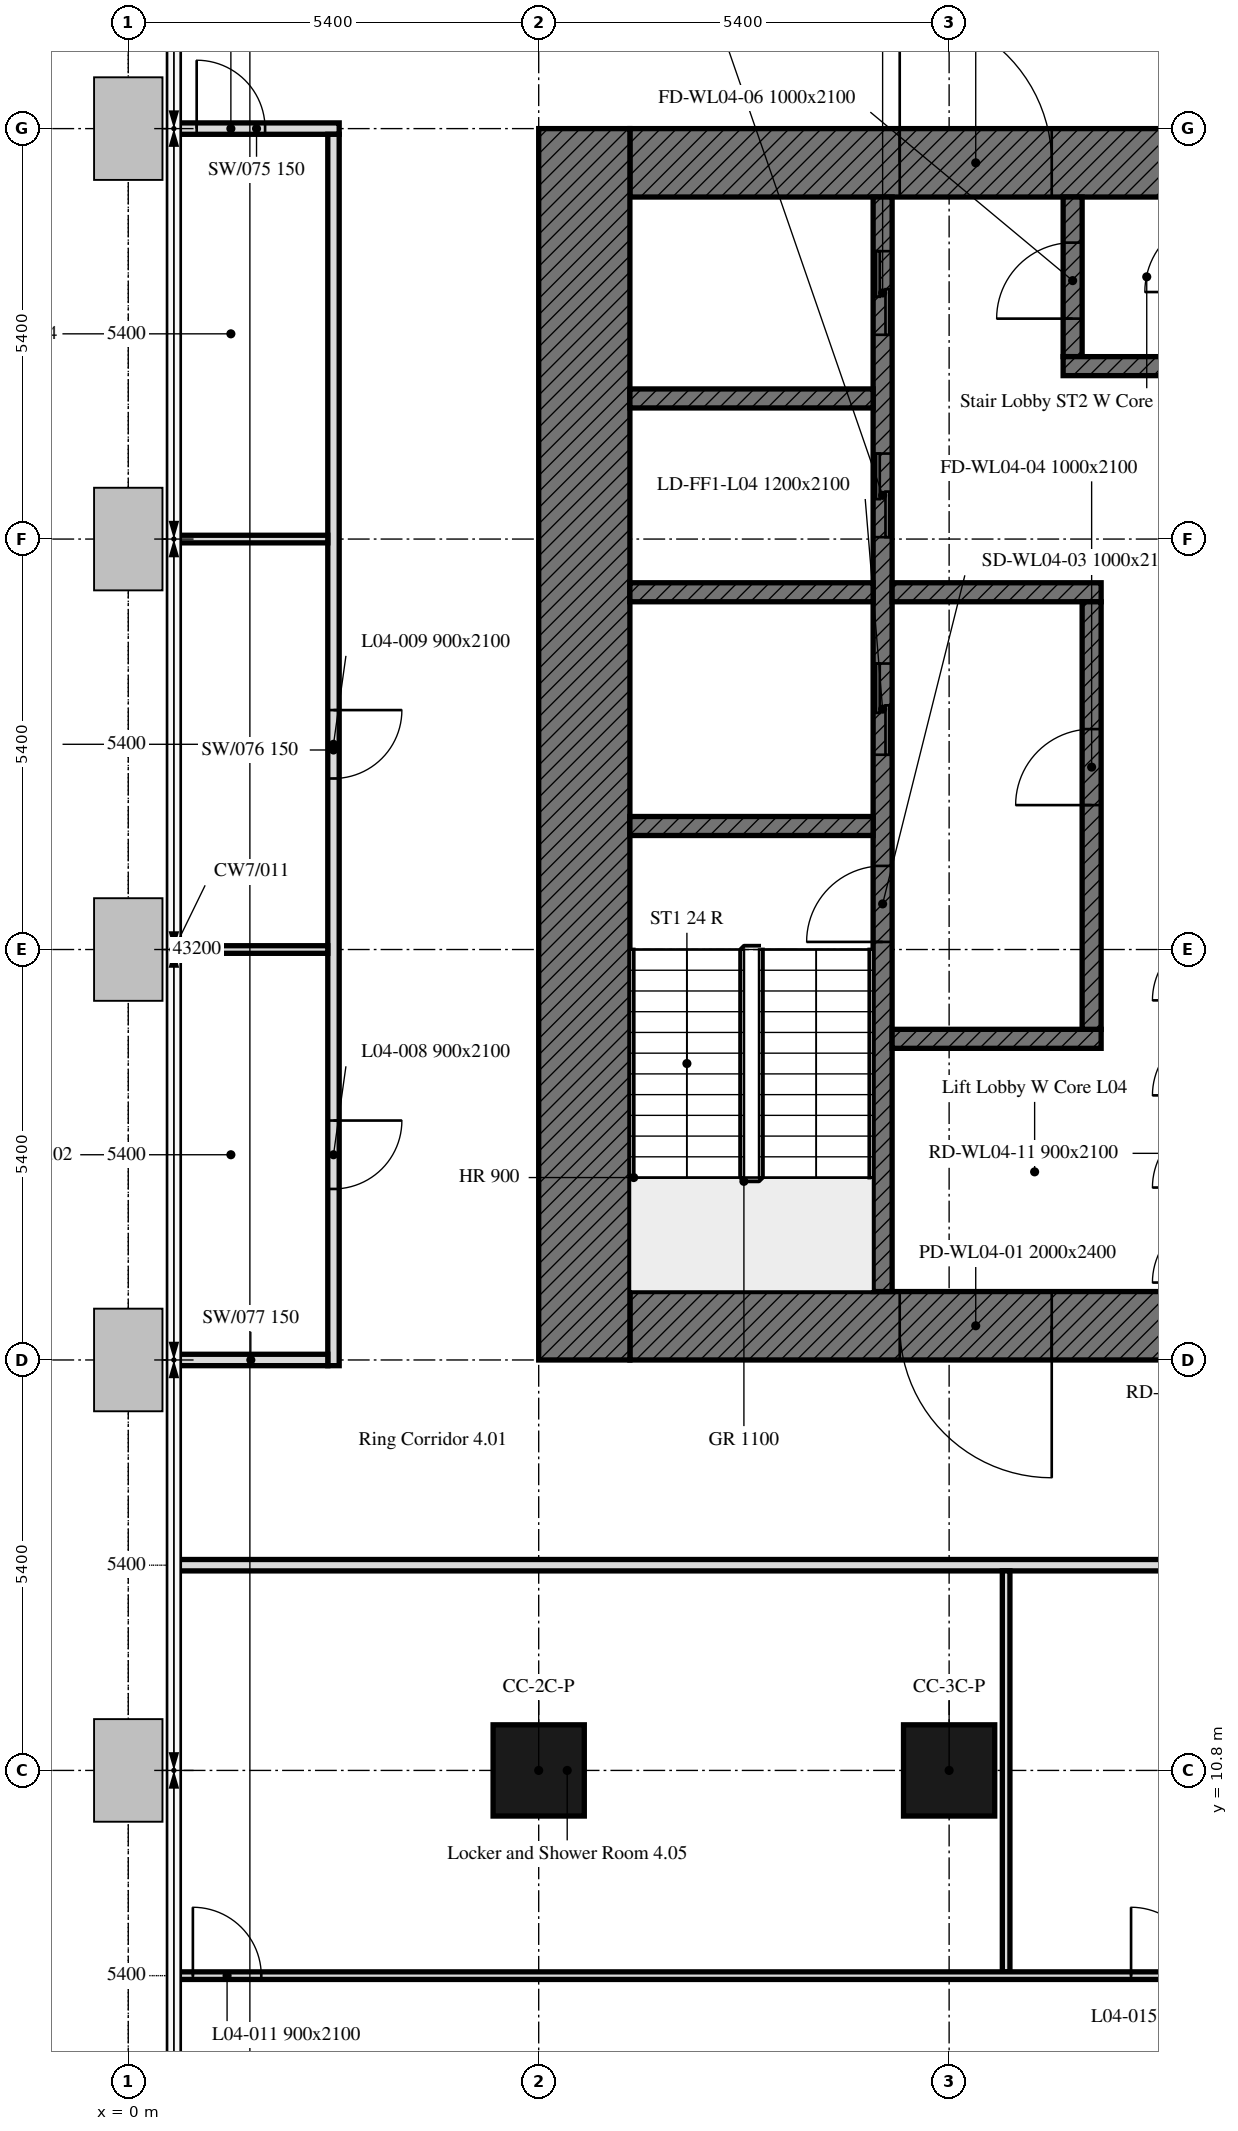
"""IFC4 building model, lengths in metres.
Left out: names, types, materials, properties, quantities, classifications, styles, units other than length and angle.
Written with IfcOpenShell. Run it as: python <this file> out.ifc"""

import sys

from ifc_helpers import new_model, si_unit, direction, frame, frame_2d, origin, origin_2d, place, context, subcontext, project, spatial, rectangle, extrude, element, fill, save


model = new_model("IFC4")
c1 = context("Model", 3, precision=1e-05, world=origin(), true_north=direction((0.0, 1.0)))
c2 = subcontext(c1, "Body", "Model", "MODEL_VIEW")
j1 = project(units=[si_unit("LENGTHUNIT", "METRE"), si_unit("PLANEANGLEUNIT", "RADIAN")], contexts=[c1])
p1 = place(None, origin())
s1 = spatial("IfcSite", under=j1, at=p1, CompositionType="ELEMENT")
p2 = place(p1, origin())
s2 = spatial("IfcBuilding", under=s1, at=p2, CompositionType="ELEMENT")
p3 = place(p2, frame((0.0, 0.0, 24.6)))
s3 = spatial("IfcBuildingStorey", under=s2, at=p3, CompositionType="ELEMENT", Elevation=24.6)
for number, where, z_axis, x_axis in (
    (1, (5.4, 10.8, 0.0), (0.0, 0.0, 1.0), (1.0, 0.0, 0.0)),
    (2, (10.8, 10.8, 0.0), (0.0, 0.0, 1.0), (1.0, 0.0, 0.0)),
):
    element("IfcColumn", number, at=place(p3, frame(where, z_axis=z_axis, x_axis=x_axis)), inside=s3, PredefinedType="COLUMN", context=c2, shape_type="SweptSolid", body=[
        extrude(rectangle(XDim=1.2, YDim=1.2, at=origin_2d()), origin(), (0.0, 0.0, 1.0), 4.1),
    ])
p4 = place(p3, frame((17.7, 16.65, 0.0), z_axis=(0.0, 0.0, 1.0), x_axis=(-1.0, 0.0, 0.0)))
e3 = element("IfcWall", 3, at=p4, inside=s3, PredefinedType="SOLIDWALL", context=c2, shape_type="SweptSolid", body=[
    extrude(rectangle(XDim=11.1, YDim=0.9, at=frame_2d((5.55, 0.0))), origin(), (0.0, 0.0, 1.0), 4.1),
])
p5 = place(p4, frame((5.55, 0.0, 0.0)))
e4 = element("IfcOpeningElement", 4, at=p5, cuts=e3, PredefinedType="OPENING", context=c2, shape_type="SweptSolid", body=[
    extrude(rectangle(XDim=2.0, YDim=2.4, at=frame_2d((1.0, 1.2))), frame((0.0, 0.45, 0.0), z_axis=(0.0, -1.0, 0.0), x_axis=(1.0, 0.0, 0.0)), (0.0, 0.0, 1.0), 0.9),
])
p6 = place(p3, frame((6.6, 31.95, 0.0), z_axis=(0.0, 0.0, 1.0), x_axis=(1.0, 0.0, 0.0)))
e5 = element("IfcWall", 5, at=p6, inside=s3, PredefinedType="SOLIDWALL", context=c2, shape_type="SweptSolid", body=[
    extrude(rectangle(XDim=11.1, YDim=0.9, at=frame_2d((5.55, 0.0))), origin(), (0.0, 0.0, 1.0), 4.1),
])
p7 = place(p6, frame((3.55, 0.0, 0.0)))
e6 = element("IfcOpeningElement", 6, at=p7, cuts=e5, PredefinedType="OPENING", context=c2, shape_type="SweptSolid", body=[
    extrude(rectangle(XDim=2.0, YDim=2.4, at=frame_2d((1.0, 1.2))), frame((0.0, 0.45, 0.0), z_axis=(0.0, -1.0, 0.0), x_axis=(1.0, 0.0, 0.0)), (0.0, 0.0, 1.0), 0.9),
])
p8 = place(p3, frame((6.0, 16.2, 0.0), z_axis=(0.0, 0.0, 1.0), x_axis=(0.0, 1.0, 0.0)))
e7 = element("IfcWall", 7, at=p8, inside=s3, PredefinedType="SOLIDWALL", context=c2, shape_type="SweptSolid", body=[
    extrude(rectangle(XDim=16.2, YDim=1.2, at=frame_2d((8.1, 0.0))), origin(), (0.0, 0.0, 1.0), 4.1),
])
p9 = place(p3, frame((9.925, 17.1, 0.0), z_axis=(0.0, 0.0, 1.0), x_axis=(0.0, 1.0, 0.0)))
e8 = element("IfcWall", 8, at=p9, inside=s3, PredefinedType="SOLIDWALL", context=c2, shape_type="SweptSolid", body=[
    extrude(rectangle(XDim=14.4, YDim=0.25, at=frame_2d((7.2, 0.0))), origin(), (0.0, 0.0, 1.0), 4.1),
])
p10 = place(p9, frame((4.6, 0.0, 0.0)))
e9 = element("IfcOpeningElement", 9, at=p10, cuts=e8, PredefinedType="OPENING", context=c2, shape_type="SweptSolid", body=[
    extrude(rectangle(XDim=1.0, YDim=2.1, at=frame_2d((0.5, 1.05))), frame((0.0, 0.125, 0.0), z_axis=(0.0, -1.0, 0.0), x_axis=(1.0, 0.0, 0.0)), (0.0, 0.0, 1.0), 0.25),
])
p11 = place(p9, frame((7.062, 0.0, 0.0)))
e10 = element("IfcOpeningElement", 10, at=p11, cuts=e8, PredefinedType="OPENING", context=c2, shape_type="SweptSolid", body=[
    extrude(rectangle(XDim=1.2, YDim=2.1, at=frame_2d((0.6, 1.05))), frame((0.0, 0.125, 0.0), z_axis=(0.0, -1.0, 0.0), x_axis=(1.0, 0.0, 0.0)), (0.0, 0.0, 1.0), 0.25),
])
p12 = place(p9, frame((9.925, 0.0, 0.0)))
e11 = element("IfcOpeningElement", 11, at=p12, cuts=e8, PredefinedType="OPENING", context=c2, shape_type="SweptSolid", body=[
    extrude(rectangle(XDim=1.1, YDim=2.1, at=frame_2d((0.55, 1.05))), frame((0.0, 0.125, 0.0), z_axis=(0.0, -1.0, 0.0), x_axis=(1.0, 0.0, 0.0)), (0.0, 0.0, 1.0), 0.25),
])
p13 = place(p9, frame((12.587, 0.0, 0.0)))
e12 = element("IfcOpeningElement", 12, at=p13, cuts=e8, PredefinedType="OPENING", context=c2, shape_type="SweptSolid", body=[
    extrude(rectangle(XDim=1.1, YDim=2.1, at=frame_2d((0.55, 1.05))), frame((0.0, 0.125, 0.0), z_axis=(0.0, -1.0, 0.0), x_axis=(1.0, 0.0, 0.0)), (0.0, 0.0, 1.0), 0.25),
])
for number, where, z_axis, x_axis in (
    (13, (6.6, 23.225, 0.0), (0.0, 0.0, 1.0), (1.0, 0.0, 0.0)),
    (14, (6.6, 26.3, 0.0), (0.0, 0.0, 1.0), (1.0, 0.0, 0.0)),
):
    element("IfcWall", number, at=place(p3, frame(where, z_axis=z_axis, x_axis=x_axis)), inside=s3, PredefinedType="SOLIDWALL", context=c2, shape_type="SweptSolid", body=[
        extrude(rectangle(XDim=3.2, YDim=0.25, at=frame_2d((1.6, 0.0))), origin(), (0.0, 0.0, 1.0), 4.1),
    ])
for number, where, z_axis, x_axis in (
    (15, (10.05, 26.3, 0.0), (0.0, 0.0, 1.0), (1.0, 0.0, 0.0)),
    (16, (10.05, 20.425, 0.0), (0.0, 0.0, 1.0), (1.0, 0.0, 0.0)),
):
    element("IfcWall", number, at=place(p3, frame(where, z_axis=z_axis, x_axis=x_axis)), inside=s3, PredefinedType="SOLIDWALL", context=c2, shape_type="SweptSolid", body=[
        extrude(rectangle(XDim=2.75, YDim=0.25, at=frame_2d((1.375, 0.0))), origin(), (0.0, 0.0, 1.0), 4.1),
    ])
p14 = place(p3, frame((12.425, 29.4, 0.0), z_axis=(0.0, 0.0, 1.0), x_axis=(0.0, 1.0, 0.0)))
e17 = element("IfcWall", 17, at=p14, inside=s3, PredefinedType="SOLIDWALL", context=c2, shape_type="SweptSolid", body=[
    extrude(rectangle(XDim=2.1, YDim=0.25, at=frame_2d((1.05, 0.0))), origin(), (0.0, 0.0, 1.0), 4.1),
])
p15 = place(p14, frame((0.5, 0.0, 0.0)))
e18 = element("IfcOpeningElement", 18, at=p15, cuts=e17, PredefinedType="OPENING", context=c2, shape_type="SweptSolid", body=[
    extrude(rectangle(XDim=1.0, YDim=2.1, at=frame_2d((0.5, 1.05))), frame((0.0, 0.125, 0.0), z_axis=(0.0, -1.0, 0.0), x_axis=(1.0, 0.0, 0.0)), (0.0, 0.0, 1.0), 0.25),
])
p16 = place(p3, frame((12.3, 29.275, 0.0), z_axis=(0.0, 0.0, 1.0), x_axis=(1.0, 0.0, 0.0)))
e19 = element("IfcWall", 19, at=p16, inside=s3, PredefinedType="SOLIDWALL", context=c2, shape_type="SweptSolid", body=[
    extrude(rectangle(XDim=1.95, YDim=0.25, at=frame_2d((0.975, 0.0))), origin(), (0.0, 0.0, 1.0), 4.1),
])
p17 = place(p3, frame((12.675, 20.55, 0.0), z_axis=(0.0, 0.0, 1.0), x_axis=(0.0, 1.0, 0.0)))
e20 = element("IfcWall", 20, at=p17, inside=s3, PredefinedType="SOLIDWALL", context=c2, shape_type="SweptSolid", body=[
    extrude(rectangle(XDim=5.625, YDim=0.25, at=frame_2d((2.812, 0.0))), origin(), (0.0, 0.0, 1.0), 4.1),
])
p18 = place(p17, frame((2.95, 0.0, 0.0)))
e21 = element("IfcOpeningElement", 21, at=p18, cuts=e20, PredefinedType="OPENING", context=c2, shape_type="SweptSolid", body=[
    extrude(rectangle(XDim=1.0, YDim=2.1, at=frame_2d((0.5, 1.05))), frame((0.0, 0.125, 0.0), z_axis=(0.0, -1.0, 0.0), x_axis=(1.0, 0.0, 0.0)), (0.0, 0.0, 1.0), 0.25),
])
p19 = place(p3, frame((6.6, 28.85, 0.0), z_axis=(0.0, 0.0, 1.0), x_axis=(1.0, 0.0, 0.0)))
e22 = element("IfcWall", 22, at=p19, inside=s3, PredefinedType="SOLIDWALL", context=c2, shape_type="SweptSolid", body=[
    extrude(rectangle(XDim=3.2, YDim=0.25, at=frame_2d((1.6, 0.0))), origin(), (0.0, 0.0, 1.0), 4.1),
])
p20 = place(p3, frame((0.6, 32.4, 0.0), z_axis=(0.0, 0.0, 1.0), x_axis=(1.0, 0.0, 0.0)))
e23 = element("IfcWall", 23, at=p20, inside=s3, PredefinedType="PARTITIONING", context=c2, shape_type="SweptSolid", body=[
    extrude(rectangle(XDim=2.175, YDim=0.15, at=frame_2d((1.087, 0.0))), origin(), (0.0, 0.0, 1.0), 3.35),
])
p21 = place(p20, frame((0.3, 0.0, 0.0)))
e24 = element("IfcOpeningElement", 24, at=p21, cuts=e23, PredefinedType="OPENING", context=c2, shape_type="SweptSolid", body=[
    extrude(rectangle(XDim=0.9, YDim=2.1, at=frame_2d((0.45, 1.05))), frame((0.0, 0.075, 0.0), z_axis=(0.0, -1.0, 0.0), x_axis=(1.0, 0.0, 0.0)), (0.0, 0.0, 1.0), 0.15),
])
p22 = place(p3, frame((2.7, 32.325, 0.0), z_axis=(0.0, 0.0, 1.0), x_axis=(0.0, -1.0, 0.0)))
e25 = element("IfcWall", 25, at=p22, inside=s3, PredefinedType="PARTITIONING", context=c2, shape_type="SweptSolid", body=[
    extrude(rectangle(XDim=16.2, YDim=0.15, at=frame_2d((8.1, 0.0))), origin(), (0.0, 0.0, 1.0), 3.35),
])
p23 = place(p22, frame((12.975, 0.0, 0.0)))
e26 = element("IfcOpeningElement", 26, at=p23, cuts=e25, PredefinedType="OPENING", context=c2, shape_type="SweptSolid", body=[
    extrude(rectangle(XDim=0.9, YDim=2.1, at=frame_2d((0.45, 1.05))), frame((0.0, 0.075, 0.0), z_axis=(0.0, -1.0, 0.0), x_axis=(1.0, 0.0, 0.0)), (0.0, 0.0, 1.0), 0.15),
])
p24 = place(p22, frame((7.575, 0.0, 0.0)))
e27 = element("IfcOpeningElement", 27, at=p24, cuts=e25, PredefinedType="OPENING", context=c2, shape_type="SweptSolid", body=[
    extrude(rectangle(XDim=0.9, YDim=2.1, at=frame_2d((0.45, 1.05))), frame((0.0, 0.075, 0.0), z_axis=(0.0, -1.0, 0.0), x_axis=(1.0, 0.0, 0.0)), (0.0, 0.0, 1.0), 0.15),
])
p25 = place(p3, frame((2.625, 16.2, 0.0), z_axis=(0.0, 0.0, 1.0), x_axis=(-1.0, 0.0, 0.0)))
e28 = element("IfcWall", 28, at=p25, inside=s3, PredefinedType="PARTITIONING", context=c2, shape_type="SweptSolid", body=[
    extrude(rectangle(XDim=2.025, YDim=0.15, at=frame_2d((1.012, 0.0))), origin(), (0.0, 0.0, 1.0), 4.1),
])
p26 = place(p3, frame((0.6, 13.5, 0.0), z_axis=(0.0, 0.0, 1.0), x_axis=(1.0, 0.0, 0.0)))
e29 = element("IfcWall", 29, at=p26, inside=s3, PredefinedType="PARTITIONING", context=c2, shape_type="SweptSolid", body=[
    extrude(rectangle(XDim=42.0, YDim=0.15, at=frame_2d((21.0, 0.0))), origin(), (0.0, 0.0, 1.0), 3.35),
])
p27 = place(p26, frame((28.744, 0.0, 0.0)))
e30 = element("IfcOpeningElement", 30, at=p27, cuts=e29, PredefinedType="OPENING", context=c2, shape_type="SweptSolid", body=[
    extrude(rectangle(XDim=0.9, YDim=2.1, at=frame_2d((0.45, 1.05))), frame((0.0, 0.075, 0.0), z_axis=(0.0, -1.0, 0.0), x_axis=(1.0, 0.0, 0.0)), (0.0, 0.0, 1.0), 0.15),
])
p28 = place(p26, frame((34.05, 0.0, 0.0)))
e31 = element("IfcOpeningElement", 31, at=p28, cuts=e29, PredefinedType="OPENING", context=c2, shape_type="SweptSolid", body=[
    extrude(rectangle(XDim=0.9, YDim=2.1, at=frame_2d((0.45, 1.05))), frame((0.0, 0.075, 0.0), z_axis=(0.0, -1.0, 0.0), x_axis=(1.0, 0.0, 0.0)), (0.0, 0.0, 1.0), 0.15),
])
p29 = place(p3, frame((11.55, 8.15, 0.0), z_axis=(0.0, 0.0, 1.0), x_axis=(0.0, 1.0, 0.0)))
e32 = element("IfcWall", 32, at=p29, inside=s3, PredefinedType="PARTITIONING", context=c2, shape_type="SweptSolid", body=[
    extrude(rectangle(XDim=5.275, YDim=0.1, at=frame_2d((2.638, 0.0))), origin(), (0.0, 0.0, 1.0), 3.35),
])
p30 = place(p3, frame((0.6, 8.1, 0.0), z_axis=(0.0, 0.0, 1.0), x_axis=(1.0, 0.0, 0.0)))
e33 = element("IfcWall", 33, at=p30, inside=s3, PredefinedType="PARTITIONING", context=c2, shape_type="SweptSolid", body=[
    extrude(rectangle(XDim=42.0, YDim=0.1, at=frame_2d((21.0, 0.0))), origin(), (0.0, 0.0, 1.0), 3.35),
])
p31 = place(p30, frame((0.25, 0.0, 0.0)))
e34 = element("IfcOpeningElement", 34, at=p31, cuts=e33, PredefinedType="OPENING", context=c2, shape_type="SweptSolid", body=[
    extrude(rectangle(XDim=0.9, YDim=2.1, at=frame_2d((0.45, 1.05))), frame((0.0, 0.05, 0.0), z_axis=(0.0, -1.0, 0.0), x_axis=(1.0, 0.0, 0.0)), (0.0, 0.0, 1.0), 0.1),
])
p32 = place(p30, frame((23.25, 0.0, 0.0)))
e35 = element("IfcOpeningElement", 35, at=p32, cuts=e33, PredefinedType="OPENING", context=c2, shape_type="SweptSolid", body=[
    extrude(rectangle(XDim=0.9, YDim=2.1, at=frame_2d((0.45, 1.05))), frame((0.0, 0.05, 0.0), z_axis=(0.0, -1.0, 0.0), x_axis=(1.0, 0.0, 0.0)), (0.0, 0.0, 1.0), 0.1),
])
p33 = place(p30, frame((34.05, 0.0, 0.0)))
e36 = element("IfcOpeningElement", 36, at=p33, cuts=e33, PredefinedType="OPENING", context=c2, shape_type="SweptSolid", body=[
    extrude(rectangle(XDim=0.9, YDim=2.1, at=frame_2d((0.45, 1.05))), frame((0.0, 0.05, 0.0), z_axis=(0.0, -1.0, 0.0), x_axis=(1.0, 0.0, 0.0)), (0.0, 0.0, 1.0), 0.1),
])
p34 = place(p30, frame((39.675, 0.0, 0.0)))
e37 = element("IfcOpeningElement", 37, at=p34, cuts=e33, PredefinedType="OPENING", context=c2, shape_type="SweptSolid", body=[
    extrude(rectangle(XDim=0.9, YDim=2.1, at=frame_2d((0.45, 1.05))), frame((0.0, 0.05, 0.0), z_axis=(0.0, -1.0, 0.0), x_axis=(1.0, 0.0, 0.0)), (0.0, 0.0, 1.0), 0.1),
])
p35 = place(p30, frame((12.594, 0.0, 0.0)))
e38 = element("IfcOpeningElement", 38, at=p35, cuts=e33, PredefinedType="OPENING", context=c2, shape_type="SweptSolid", body=[
    extrude(rectangle(XDim=0.9, YDim=2.1, at=frame_2d((0.45, 1.05))), frame((0.0, 0.05, 0.0), z_axis=(0.0, -1.0, 0.0), x_axis=(1.0, 0.0, 0.0)), (0.0, 0.0, 1.0), 0.1),
])
for number, where, z_axis, x_axis in (
    (39, (2.625, 21.6, 0.0), (0.0, 0.0, 1.0), (-1.0, 0.0, 0.0)),
    (40, (2.625, 27.0, 0.0), (0.0, 0.0, 1.0), (-1.0, 0.0, 0.0)),
):
    element("IfcWall", number, at=place(p3, frame(where, z_axis=z_axis, x_axis=x_axis)), inside=s3, PredefinedType="PARTITIONING", context=c2, shape_type="SweptSolid", body=[
        extrude(rectangle(XDim=2.025, YDim=0.1, at=frame_2d((1.012, 0.0))), origin(), (0.0, 0.0, 1.0), 4.1),
    ])
p36 = place(p5, origin())
e41 = element("IfcDoor", 41, at=p36, inside=s3, OperationType="DOUBLE_DOOR_SINGLE_SWING", PredefinedType="DOOR", context=c2, shape_type="SweptSolid", body=[
    extrude(rectangle(XDim=2.0, YDim=2.4, at=frame_2d((1.0, 1.2))), frame((0.0, 0.025, 0.0), z_axis=(0.0, -1.0, 0.0), x_axis=(1.0, 0.0, 0.0)), (0.0, 0.0, 1.0), 0.05),
])
fill(e4, e41)
p37 = place(p7, origin())
e42 = element("IfcDoor", 42, at=p37, inside=s3, OperationType="DOUBLE_DOOR_SINGLE_SWING", PredefinedType="DOOR", context=c2, shape_type="SweptSolid", body=[
    extrude(rectangle(XDim=2.0, YDim=2.4, at=frame_2d((1.0, 1.2))), frame((0.0, 0.025, 0.0), z_axis=(0.0, -1.0, 0.0), x_axis=(1.0, 0.0, 0.0)), (0.0, 0.0, 1.0), 0.05),
])
fill(e6, e42)
p38 = place(p10, origin())
e43 = element("IfcDoor", 43, at=p38, inside=s3, OperationType="SINGLE_SWING_LEFT", PredefinedType="DOOR", context=c2, shape_type="SweptSolid", body=[
    extrude(rectangle(XDim=1.0, YDim=2.1, at=frame_2d((0.5, 1.05))), frame((0.0, 0.025, 0.0), z_axis=(0.0, -1.0, 0.0), x_axis=(1.0, 0.0, 0.0)), (0.0, 0.0, 1.0), 0.05),
])
fill(e9, e43)
p39 = place(p18, origin())
e44 = element("IfcDoor", 44, at=p39, inside=s3, OperationType="SINGLE_SWING_LEFT", PredefinedType="DOOR", context=c2, shape_type="SweptSolid", body=[
    extrude(rectangle(XDim=1.0, YDim=2.1, at=frame_2d((0.5, 1.05))), frame((0.0, 0.025, 0.0), z_axis=(0.0, -1.0, 0.0), x_axis=(1.0, 0.0, 0.0)), (0.0, 0.0, 1.0), 0.05),
])
fill(e21, e44)
p40 = place(p15, origin())
e45 = element("IfcDoor", 45, at=p40, inside=s3, OperationType="SINGLE_SWING_LEFT", PredefinedType="DOOR", context=c2, shape_type="SweptSolid", body=[
    extrude(rectangle(XDim=1.0, YDim=2.1, at=frame_2d((0.5, 1.05))), frame((0.0, 0.025, 0.0), z_axis=(0.0, -1.0, 0.0), x_axis=(1.0, 0.0, 0.0)), (0.0, 0.0, 1.0), 0.05),
])
fill(e18, e45)
p41 = place(p11, origin())
e46 = element("IfcDoor", 46, at=p41, inside=s3, OperationType="DOUBLE_DOOR_SLIDING", PredefinedType="DOOR", context=c2, shape_type="SweptSolid", body=[
    extrude(rectangle(XDim=1.2, YDim=2.1, at=frame_2d((0.6, 1.05))), frame((0.0, 0.025, 0.0), z_axis=(0.0, -1.0, 0.0), x_axis=(1.0, 0.0, 0.0)), (0.0, 0.0, 1.0), 0.05),
])
fill(e10, e46)
p42 = place(p12, origin())
e47 = element("IfcDoor", 47, at=p42, inside=s3, OperationType="DOUBLE_DOOR_SLIDING", PredefinedType="DOOR", context=c2, shape_type="SweptSolid", body=[
    extrude(rectangle(XDim=1.1, YDim=2.1, at=frame_2d((0.55, 1.05))), frame((0.0, 0.025, 0.0), z_axis=(0.0, -1.0, 0.0), x_axis=(1.0, 0.0, 0.0)), (0.0, 0.0, 1.0), 0.05),
])
fill(e11, e47)
p43 = place(p13, origin())
e48 = element("IfcDoor", 48, at=p43, inside=s3, OperationType="DOUBLE_DOOR_SLIDING", PredefinedType="DOOR", context=c2, shape_type="SweptSolid", body=[
    extrude(rectangle(XDim=1.1, YDim=2.1, at=frame_2d((0.55, 1.05))), frame((0.0, 0.025, 0.0), z_axis=(0.0, -1.0, 0.0), x_axis=(1.0, 0.0, 0.0)), (0.0, 0.0, 1.0), 0.05),
])
fill(e12, e48)
p44 = place(p23, origin())
e49 = element("IfcDoor", 49, at=p44, inside=s3, OperationType="SINGLE_SWING_RIGHT", PredefinedType="DOOR", context=c2, shape_type="SweptSolid", body=[
    extrude(rectangle(XDim=0.9, YDim=2.1, at=frame_2d((0.45, 1.05))), frame((0.0, 0.025, 0.0), z_axis=(0.0, -1.0, 0.0), x_axis=(1.0, 0.0, 0.0)), (0.0, 0.0, 1.0), 0.05),
])
fill(e26, e49)
p45 = place(p24, origin())
e50 = element("IfcDoor", 50, at=p45, inside=s3, OperationType="SINGLE_SWING_RIGHT", PredefinedType="DOOR", context=c2, shape_type="SweptSolid", body=[
    extrude(rectangle(XDim=0.9, YDim=2.1, at=frame_2d((0.45, 1.05))), frame((0.0, 0.025, 0.0), z_axis=(0.0, -1.0, 0.0), x_axis=(1.0, 0.0, 0.0)), (0.0, 0.0, 1.0), 0.05),
])
fill(e27, e50)
p46 = place(p21, origin())
e51 = element("IfcDoor", 51, at=p46, inside=s3, OperationType="SINGLE_SWING_RIGHT", PredefinedType="DOOR", context=c2, shape_type="SweptSolid", body=[
    extrude(rectangle(XDim=0.9, YDim=2.1, at=frame_2d((0.45, 1.05))), frame((0.0, 0.025, 0.0), z_axis=(0.0, -1.0, 0.0), x_axis=(1.0, 0.0, 0.0)), (0.0, 0.0, 1.0), 0.05),
])
fill(e24, e51)
p47 = place(p31, origin())
e52 = element("IfcDoor", 52, at=p47, inside=s3, OperationType="SINGLE_SWING_RIGHT", PredefinedType="DOOR", context=c2, shape_type="SweptSolid", body=[
    extrude(rectangle(XDim=0.9, YDim=2.1, at=frame_2d((0.45, 1.05))), frame((0.0, 0.025, 0.0), z_axis=(0.0, -1.0, 0.0), x_axis=(1.0, 0.0, 0.0)), (0.0, 0.0, 1.0), 0.05),
])
fill(e34, e52)
p48 = place(p35, origin())
e53 = element("IfcDoor", 53, at=p48, inside=s3, OperationType="SINGLE_SWING_LEFT", PredefinedType="DOOR", context=c2, shape_type="SweptSolid", body=[
    extrude(rectangle(XDim=0.9, YDim=2.1, at=frame_2d((0.45, 1.05))), frame((0.0, 0.025, 0.0), z_axis=(0.0, -1.0, 0.0), x_axis=(1.0, 0.0, 0.0)), (0.0, 0.0, 1.0), 0.05),
])
fill(e38, e53)
save(model, sys.argv[1])
